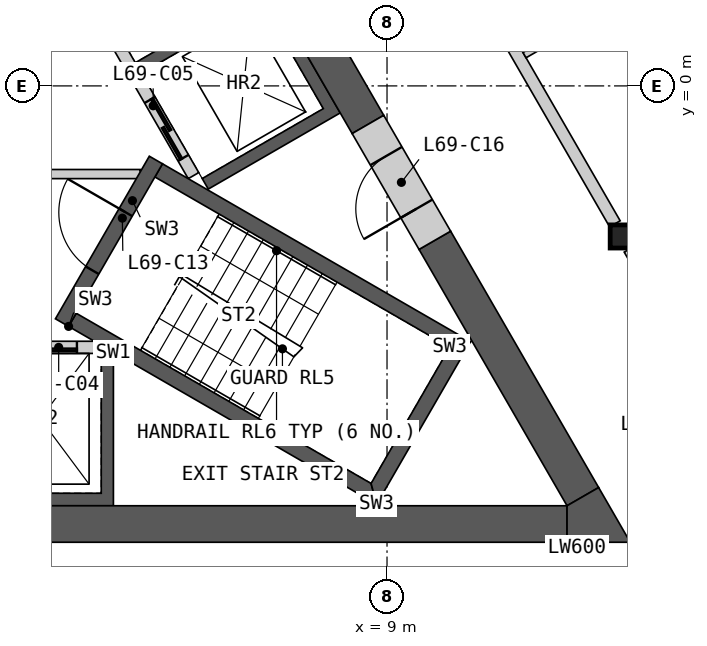
"""IFC4 building model, lengths in metres.
Left out: names, types, materials, properties, quantities, classifications, styles, units other than length and angle.
Written with IfcOpenShell. Run it as: python <this file> out.ifc"""

import sys

from ifc_helpers import new_model, si_unit, direction, frame, frame_2d, origin, origin_2d, place, context, subcontext, project, spatial, polyline, rectangle, i_section, outline, extrude, element, fill, save


model = new_model("IFC4")
c1 = context("Model", 3, precision=1e-05, world=origin(), true_north=direction((0.0, 1.0)))
c2 = subcontext(c1, "Body", "Model", "MODEL_VIEW")
j1 = project(units=[si_unit("LENGTHUNIT", "METRE"), si_unit("PLANEANGLEUNIT", "RADIAN")], contexts=[c1])
p1 = place(None, origin())
s1 = spatial("IfcSite", under=j1, at=p1, CompositionType="ELEMENT")
p2 = place(p1, origin())
s2 = spatial("IfcBuilding", under=s1, at=p2, CompositionType="ELEMENT")
p3 = place(p2, frame((0.0, 0.0, 315.4)))
s3 = spatial("IfcBuildingStorey", under=s2, at=p3, CompositionType="ELEMENT", Elevation=315.4)
p4 = place(p3, frame((12.868, -2.476, 0.0), z_axis=(0.0, 0.0, 1.0), x_axis=(1.0, 0.0, 0.0)))
e1 = element("IfcColumn", 1, at=p4, inside=s3, PredefinedType="COLUMN", context=c2, shape_type="SweptSolid", body=[
    extrude(i_section(OverallWidth=0.396, OverallDepth=0.381, WebThickness=0.019, FlangeThickness=0.03, at=origin_2d()), origin(), (0.0, 0.0, 1.0), 3.4),
])
p5 = place(p3, origin())
e2 = element("IfcWall", 2, at=p5, inside=s3, PredefinedType="SHEAR", context=c2, shape_type="SweptSolid", body=[
    extrude(outline(polyline([(4.5, -4.4), (4.5, -6.906), (-4.5, -6.906), (-4.5, -4.4), (-4.3, -4.4), (-4.3, -6.7), (-2.3, -6.7), (-2.3, -4.4), (-2.1, -4.4), (-2.1, -6.7), (-0.1, -6.7), (-0.1, -4.4), (0.1, -4.4), (0.1, -6.7), (2.1, -6.7), (2.1, -4.4), (2.3, -4.4), (2.3, -6.7), (4.3, -6.7), (4.3, -4.4), (4.5, -4.4)])), origin(), (0.0, 0.0, 1.0), 3.1),
])
p6 = place(p3, frame((-4.187, -4.3, 0.0), z_axis=(0.0, 0.0, 1.0), x_axis=(1.0, 0.0, 0.0)))
e3 = element("IfcWall", 3, at=p6, inside=s3, PredefinedType="SOLIDWALL", context=c2, shape_type="SweptSolid", body=[
    extrude(rectangle(XDim=8.373, YDim=0.2, at=frame_2d((4.187, 0.0))), origin(), (0.0, 0.0, 1.0), 3.1),
])
p7 = place(p6, frame((0.287, 0.0, 0.0)))
e4 = element("IfcOpeningElement", 4, at=p7, cuts=e3, PredefinedType="OPENING", context=c2, shape_type="SweptSolid", body=[
    extrude(rectangle(XDim=1.2, YDim=2.1, at=frame_2d((0.6, 1.05))), frame((0.0, 0.11, 0.0), z_axis=(0.0, -1.0, 0.0), x_axis=(1.0, 0.0, 0.0)), (0.0, 0.0, 1.0), 0.22),
])
p8 = place(p6, frame((2.387, 0.0, 0.0)))
e5 = element("IfcOpeningElement", 5, at=p8, cuts=e3, PredefinedType="OPENING", context=c2, shape_type="SweptSolid", body=[
    extrude(rectangle(XDim=1.4, YDim=2.1, at=frame_2d((0.7, 1.05))), frame((0.0, 0.11, 0.0), z_axis=(0.0, -1.0, 0.0), x_axis=(1.0, 0.0, 0.0)), (0.0, 0.0, 1.0), 0.22),
])
p9 = place(p6, frame((4.737, 0.0, 0.0)))
e6 = element("IfcOpeningElement", 6, at=p9, cuts=e3, PredefinedType="OPENING", context=c2, shape_type="SweptSolid", body=[
    extrude(rectangle(XDim=1.1, YDim=2.1, at=frame_2d((0.55, 1.05))), frame((0.0, 0.11, 0.0), z_axis=(0.0, -1.0, 0.0), x_axis=(1.0, 0.0, 0.0)), (0.0, 0.0, 1.0), 0.22),
])
p10 = place(p6, frame((6.887, 0.0, 0.0)))
e7 = element("IfcOpeningElement", 7, at=p10, cuts=e3, PredefinedType="OPENING", context=c2, shape_type="SweptSolid", body=[
    extrude(rectangle(XDim=1.2, YDim=2.1, at=frame_2d((0.6, 1.05))), frame((0.0, 0.11, 0.0), z_axis=(0.0, -1.0, 0.0), x_axis=(1.0, 0.0, 0.0)), (0.0, 0.0, 1.0), 0.22),
])
p11 = place(p3, origin())
e8 = element("IfcWall", 8, at=p11, inside=s3, PredefinedType="SHEAR", context=c2, shape_type="SweptSolid", body=[
    extrude(outline(polyline([(1.561, 6.097), (3.731, 7.35), (8.231, -0.444), (6.061, -1.697), (5.96, -1.524), (7.952, -0.374), (6.952, 1.358), (4.96, 0.208), (4.861, 0.381), (6.852, 1.531), (5.852, 3.263), (3.861, 2.113), (3.76, 2.287), (5.752, 3.437), (4.752, 5.169), (2.76, 4.019), (2.66, 4.192), (4.652, 5.342), (3.652, 7.074), (1.66, 5.924), (1.561, 6.097)])), origin(), (0.0, 0.0, 1.0), 3.1),
])
p12 = place(p3, frame((5.817, -1.476, 0.0), z_axis=(0.0, 0.0, 1.0), x_axis=(-0.500002616675, 0.866023893041, 0.0)))
e9 = element("IfcWall", 9, at=p12, inside=s3, PredefinedType="SOLIDWALL", context=c2, shape_type="SweptSolid", body=[
    extrude(rectangle(XDim=8.373, YDim=0.2, at=frame_2d((4.187, 0.0))), origin(), (0.0, 0.0, 1.0), 3.1),
])
p13 = place(p12, frame((0.337, 0.0, 0.0)))
e10 = element("IfcOpeningElement", 10, at=p13, cuts=e9, PredefinedType="OPENING", context=c2, shape_type="SweptSolid", body=[
    extrude(rectangle(XDim=1.1, YDim=2.1, at=frame_2d((0.55, 1.05))), frame((0.0, 0.11, 0.0), z_axis=(0.0, -1.0, 0.0), x_axis=(1.0, 0.0, 0.0)), (0.0, 0.0, 1.0), 0.22),
])
p14 = place(p12, frame((2.537, 0.0, 0.0)))
e11 = element("IfcOpeningElement", 11, at=p14, cuts=e9, PredefinedType="OPENING", context=c2, shape_type="SweptSolid", body=[
    extrude(rectangle(XDim=1.1, YDim=2.1, at=frame_2d((0.55, 1.05))), frame((0.0, 0.11, 0.0), z_axis=(0.0, -1.0, 0.0), x_axis=(1.0, 0.0, 0.0)), (0.0, 0.0, 1.0), 0.22),
])
p15 = place(p12, frame((4.737, 0.0, 0.0)))
e12 = element("IfcOpeningElement", 12, at=p15, cuts=e9, PredefinedType="OPENING", context=c2, shape_type="SweptSolid", body=[
    extrude(rectangle(XDim=1.1, YDim=2.1, at=frame_2d((0.55, 1.05))), frame((0.0, 0.11, 0.0), z_axis=(0.0, -1.0, 0.0), x_axis=(1.0, 0.0, 0.0)), (0.0, 0.0, 1.0), 0.22),
])
p16 = place(p12, frame((7.037, 0.0, 0.0)))
e13 = element("IfcOpeningElement", 13, at=p16, cuts=e9, PredefinedType="OPENING", context=c2, shape_type="SweptSolid", body=[
    extrude(rectangle(XDim=0.9, YDim=2.1, at=frame_2d((0.45, 1.05))), frame((0.0, 0.11, 0.0), z_axis=(0.0, -1.0, 0.0), x_axis=(1.0, 0.0, 0.0)), (0.0, 0.0, 1.0), 0.22),
])
p17 = place(p3, frame((-4.941, -1.45, 0.0), z_axis=(0.0, 0.0, 1.0), x_axis=(1.0, 0.0, 0.0)))
e14 = element("IfcWall", 14, at=p17, inside=s3, PredefinedType="PARTITIONING", context=c2, shape_type="SweptSolid", body=[
    extrude(rectangle(XDim=9.882, YDim=0.15, at=frame_2d((4.941, 0.0))), origin(), (0.0, 0.0, 1.0), 3.1),
])
p18 = place(p17, frame((4.391, 0.0, 0.0)))
e15 = element("IfcOpeningElement", 15, at=p18, cuts=e14, PredefinedType="OPENING", context=c2, shape_type="SweptSolid", body=[
    extrude(rectangle(XDim=1.1, YDim=2.1, at=frame_2d((0.55, 1.05))), frame((0.0, 0.085, 0.0), z_axis=(0.0, -1.0, 0.0), x_axis=(1.0, 0.0, 0.0)), (0.0, 0.0, 1.0), 0.17),
])
p19 = place(p3, origin())
e16 = element("IfcWall", 16, at=p19, inside=s3, PredefinedType="SHEAR", context=c2, shape_type="SweptSolid", body=[
    extrude(outline(polyline([(3.763, -3.956), (8.83, -6.881), (8.738, -6.539), (3.888, -3.739), (3.763, -3.956)])), origin(), (0.0, 0.0, 1.0), 3.1),
])
p20 = place(p3, origin())
e17 = element("IfcWall", 17, at=p20, inside=s3, PredefinedType="SHEAR", context=c2, shape_type="SweptSolid", body=[
    extrude(outline(polyline([(8.83, -6.881), (10.374, -4.206), (10.032, -4.298), (8.738, -6.539), (8.83, -6.881)])), origin(), (0.0, 0.0, 1.0), 3.1),
])
p21 = place(p3, origin())
e18 = element("IfcWall", 18, at=p21, inside=s3, PredefinedType="SHEAR", context=c2, shape_type="SweptSolid", body=[
    extrude(outline(polyline([(10.032, -4.298), (10.374, -4.206), (5.307, -1.281), (5.182, -1.498), (10.032, -4.298)])), origin(), (0.0, 0.0, 1.0), 3.1),
])
p22 = place(p3, frame((3.655, -3.893, 0.0), z_axis=(0.0, 0.0, 1.0), x_axis=(0.499982516597, 0.866035497597, 0.0)))
e19 = element("IfcWall", 19, at=p22, inside=s3, PredefinedType="SHEAR", context=c2, shape_type="SweptSolid", body=[
    extrude(rectangle(XDim=3.088, YDim=0.25, at=frame_2d((1.544, 0.0))), origin(), (0.0, 0.0, 1.0), 3.1),
])
p23 = place(p22, frame((0.994, 0.0, 0.0)))
e20 = element("IfcOpeningElement", 20, at=p23, cuts=e19, PredefinedType="OPENING", context=c2, shape_type="SweptSolid", body=[
    extrude(rectangle(XDim=1.1, YDim=2.1, at=frame_2d((0.55, 1.05))), frame((0.0, 0.135, 0.0), z_axis=(0.0, -1.0, 0.0), x_axis=(1.0, 0.0, 0.0)), (0.0, 0.0, 1.0), 0.27),
])
p24 = place(p3, frame((-11.961, -7.206, 0.0), z_axis=(0.0, 0.0, 1.0), x_axis=(1.0, 0.0, 0.0)))
e21 = element("IfcWall", 21, at=p24, inside=s3, PredefinedType="SHEAR", context=c2, shape_type="SweptSolid", body=[
    extrude(rectangle(XDim=23.921, YDim=0.6, at=frame_2d((11.961, 0.0))), origin(), (0.0, 0.0, 1.0), 3.1),
])
p25 = place(p3, frame((8.686, -0.634, 0.0), z_axis=(0.0, 0.0, 1.0), x_axis=(-0.50001836461, 0.866014800712, 0.0)))
e22 = element("IfcWall", 22, at=p25, inside=s3, PredefinedType="SHEAR", context=c2, shape_type="SweptSolid", body=[
    extrude(rectangle(XDim=10.451, YDim=0.6, at=frame_2d((5.225, 0.0))), origin(), (0.0, 0.0, 1.0), 3.1),
])
p26 = place(p3, frame((12.221, -6.756, 0.0), z_axis=(0.0, 0.0, 1.0), x_axis=(-0.50000604952, 0.866021911064, 0.0)))
e23 = element("IfcWall", 23, at=p26, inside=s3, PredefinedType="SHEAR", context=c2, shape_type="SweptSolid", body=[
    extrude(rectangle(XDim=4.869, YDim=0.6, at=frame_2d((2.434, 0.0))), origin(), (0.0, 0.0, 1.0), 3.1),
])
p27 = place(p3, origin())
e24 = element("IfcWall", 24, at=p27, inside=s3, PredefinedType="SHEAR", context=c2, shape_type="SweptSolid", body=[
    extrude(outline(polyline([(11.961, -7.506), (11.961, -6.906), (12.48, -6.606), (13.0, -7.506), (11.961, -7.506)])), origin(), (0.0, 0.0, 1.0), 3.1),
])
p28 = place(p3, frame((9.786, -2.539, 0.0), z_axis=(0.0, 0.0, 1.0), x_axis=(-0.499981787252, 0.866035918664, 0.0)))
e25 = element("IfcWall", 25, at=p28, inside=s3, PredefinedType="SHEAR", context=c2, shape_type="SweptSolid", body=[
    extrude(rectangle(XDim=2.2, YDim=0.6, at=frame_2d((1.1, 0.0))), origin(), (0.0, 0.0, 1.0), 3.1),
])
p29 = place(p28, frame((0.6, 0.0, 0.0)))
e26 = element("IfcOpeningElement", 26, at=p29, cuts=e25, PredefinedType="OPENING", context=c2, shape_type="SweptSolid", body=[
    extrude(rectangle(XDim=1.0, YDim=2.1, at=frame_2d((0.5, 1.05))), frame((0.0, 0.31, 0.0), z_axis=(0.0, -1.0, 0.0), x_axis=(1.0, 0.0, 0.0)), (0.0, 0.0, 1.0), 0.62),
])
p30 = place(p3, frame((8.698, 4.745, 0.0), z_axis=(0.0, 0.0, 1.0), x_axis=(0.499984266882, -0.866034487114, 0.0)))
e27 = element("IfcWall", 27, at=p30, inside=s3, PredefinedType="PARTITIONING", context=c2, shape_type="SweptSolid", body=[
    extrude(rectangle(XDim=8.099, YDim=0.2, at=frame_2d((4.049, 0.0))), origin(), (0.0, 0.0, 1.0), 3.1),
])
p31 = place(p3, frame((12.988, -2.684, 0.0), z_axis=(0.0, 0.0, 1.0), x_axis=(0.500003406062, -0.866023437285, 0.0)))
e28 = element("IfcWall", 28, at=p31, inside=s3, PredefinedType="PARTITIONING", context=c2, shape_type="SweptSolid", body=[
    extrude(rectangle(XDim=4.288, YDim=0.2, at=frame_2d((2.144, 0.0))), origin(), (0.0, 0.0, 1.0), 3.1),
])
p32 = place(p31, frame((2.521, 0.0, 0.0)))
e29 = element("IfcOpeningElement", 29, at=p32, cuts=e28, PredefinedType="OPENING", context=c2, shape_type="SweptSolid", body=[
    extrude(rectangle(XDim=1.0, YDim=2.1, at=frame_2d((0.5, 1.05))), frame((0.0, 0.11, 0.0), z_axis=(0.0, -1.0, 0.0), x_axis=(1.0, 0.0, 0.0)), (0.0, 0.0, 1.0), 0.22),
])
p33 = place(p3, frame((11.261, 0.506, 0.0), z_axis=(0.0, 0.0, 1.0), x_axis=(0.866024323732, 0.500001870701, 0.0)))
e30 = element("IfcWall", 30, at=p33, inside=s3, PredefinedType="PARTITIONING", context=c2, shape_type="SweptSolid", body=[
    extrude(rectangle(XDim=7.967, YDim=0.1, at=frame_2d((3.983, 0.0))), origin(), (0.0, 0.0, 1.0), 2.33),
])
p34 = place(p33, frame((5.865, 0.0, 0.0)))
e31 = element("IfcOpeningElement", 31, at=p34, cuts=e30, PredefinedType="OPENING", context=c2, shape_type="SweptSolid", body=[
    extrude(rectangle(XDim=0.95, YDim=2.1, at=frame_2d((0.475, 1.05))), frame((0.0, 0.06, 0.0), z_axis=(0.0, -1.0, 0.0), x_axis=(1.0, 0.0, 0.0)), (0.0, 0.0, 1.0), 0.12),
])
p35 = place(p10, origin())
e32 = element("IfcDoor", 32, at=p35, inside=s3, OperationType="SLIDING_TO_LEFT", PredefinedType="DOOR", context=c2, shape_type="SweptSolid", body=[
    extrude(rectangle(XDim=1.2, YDim=2.1, at=frame_2d((0.6, 1.05))), frame((0.0, 0.025, 0.0), z_axis=(0.0, -1.0, 0.0), x_axis=(1.0, 0.0, 0.0)), (0.0, 0.0, 1.0), 0.05),
])
fill(e7, e32)
p36 = place(p13, origin())
e33 = element("IfcDoor", 33, at=p36, inside=s3, OperationType="SLIDING_TO_LEFT", PredefinedType="DOOR", context=c2, shape_type="SweptSolid", body=[
    extrude(rectangle(XDim=1.1, YDim=2.1, at=frame_2d((0.55, 1.05))), frame((0.0, 0.025, 0.0), z_axis=(0.0, -1.0, 0.0), x_axis=(1.0, 0.0, 0.0)), (0.0, 0.0, 1.0), 0.05),
])
fill(e10, e33)
p37 = place(p23, origin())
e34 = element("IfcDoor", 34, at=p37, inside=s3, OperationType="SINGLE_SWING_RIGHT", PredefinedType="DOOR", context=c2, shape_type="SweptSolid", body=[
    extrude(rectangle(XDim=1.1, YDim=2.1, at=frame_2d((0.55, 1.05))), frame((0.0, 0.025, 0.0), z_axis=(0.0, -1.0, 0.0), x_axis=(1.0, 0.0, 0.0)), (0.0, 0.0, 1.0), 0.05),
])
fill(e20, e34)
p38 = place(p29, origin())
e35 = element("IfcDoor", 35, at=p38, inside=s3, OperationType="SINGLE_SWING_LEFT", PredefinedType="DOOR", context=c2, shape_type="SweptSolid", body=[
    extrude(rectangle(XDim=1.0, YDim=2.1, at=frame_2d((0.5, 1.05))), frame((0.0, 0.055, 0.0), z_axis=(0.0, -1.0, 0.0), x_axis=(1.0, 0.0, 0.0)), (0.0, 0.0, 1.0), 0.05),
])
fill(e26, e35)
save(model, sys.argv[1])
